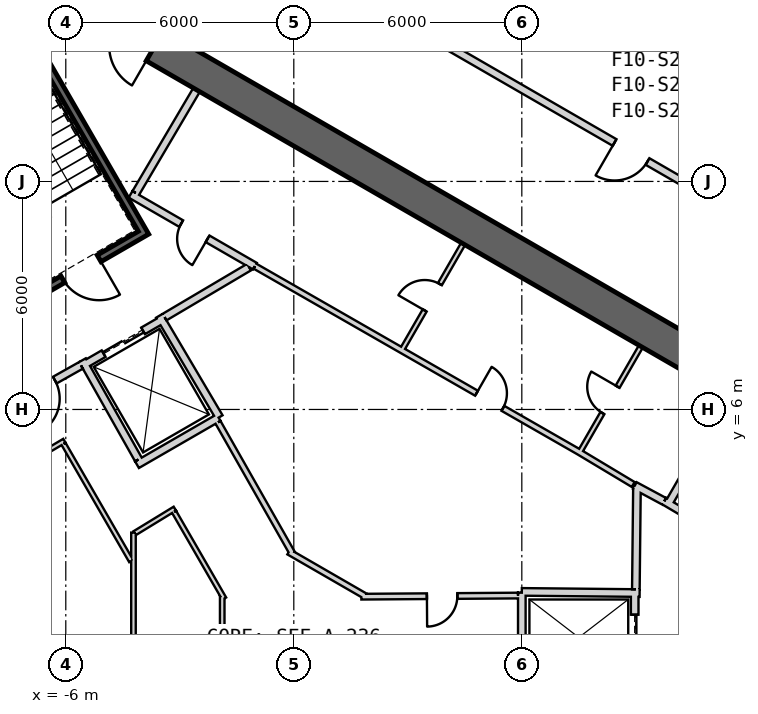
"""IFC4 building model, lengths in metres.
Left out: names, types, materials, properties, quantities, classifications, styles, units other than length and angle.
Written with IfcOpenShell. Run it as: python <this file> out.ifc"""

import sys

from ifc_helpers import new_model, si_unit, direction, frame, frame_2d, origin, place, context, subcontext, project, spatial, rectangle, extrude, element, fill, save


model = new_model("IFC4")
c1 = context("Model", 3, precision=1e-05, world=origin(), true_north=direction((0.0, 1.0)))
c2 = subcontext(c1, "Body", "Model", "MODEL_VIEW")
j1 = project(units=[si_unit("LENGTHUNIT", "METRE"), si_unit("PLANEANGLEUNIT", "RADIAN")], contexts=[c1])
p1 = place(None, origin())
s1 = spatial("IfcSite", under=j1, at=p1, CompositionType="ELEMENT")
p2 = place(p1, origin())
s2 = spatial("IfcBuilding", under=s1, at=p2, CompositionType="ELEMENT")
p3 = place(p2, frame((0.0, 0.0, 333.8)))
s3 = spatial("IfcBuildingStorey", under=s2, at=p3, CompositionType="ELEMENT", Elevation=333.8)
p4 = place(p3, frame((19.475, 2.208, 0.0), z_axis=(0.0, 0.0, 1.0), x_axis=(-0.866028369851, 0.499994862586, 0.0)))
e1 = element("IfcWall", 1, at=p4, inside=s3, PredefinedType="SHEAR", context=c2, shape_type="SweptSolid", body=[
    extrude(rectangle(XDim=31.523, YDim=0.9, at=frame_2d((15.762, 0.0))), origin(), (0.0, 0.0, 1.0), 3.9),
])
p5 = place(p4, frame((7.062, 0.0, 0.0)))
e2 = element("IfcOpeningElement", 2, at=p5, cuts=e1, PredefinedType="OPENING", context=c2, shape_type="SweptSolid", body=[
    extrude(rectangle(XDim=1.2, YDim=2.4, at=frame_2d((0.6, 1.2))), frame((0.0, 0.46, 0.0), z_axis=(0.0, -1.0, 0.0), x_axis=(1.0, 0.0, 0.0)), (0.0, 0.0, 1.0), 0.92),
])
p6 = place(p4, frame((3.612, 0.0, 0.0)))
e3 = element("IfcOpeningElement", 3, at=p6, cuts=e1, PredefinedType="OPENING", context=c2, shape_type="SweptSolid", body=[
    extrude(rectangle(XDim=1.2, YDim=2.4, at=frame_2d((0.6, 1.2))), frame((0.0, 0.46, 0.0), z_axis=(0.0, -1.0, 0.0), x_axis=(1.0, 0.0, 0.0)), (0.0, 0.0, 1.0), 0.92),
])
p7 = place(p4, frame((26.712, 0.0, 0.0)))
e4 = element("IfcOpeningElement", 4, at=p7, cuts=e1, PredefinedType="OPENING", context=c2, shape_type="SweptSolid", body=[
    extrude(rectangle(XDim=1.2, YDim=2.4, at=frame_2d((0.6, 1.2))), frame((0.0, 0.46, 0.0), z_axis=(0.0, -1.0, 0.0), x_axis=(1.0, 0.0, 0.0)), (0.0, 0.0, 1.0), 0.92),
])
p8 = place(p3, frame((9.847, 3.495, 0.0), z_axis=(0.0, 0.0, 1.0), x_axis=(0.499984717929, 0.866034226713, 0.0)))
e5 = element("IfcWall", 5, at=p8, inside=s3, PredefinedType="PLUMBINGWALL", context=c2, shape_type="SweptSolid", body=[
    extrude(rectangle(XDim=3.25, YDim=0.2, at=frame_2d((1.625, 0.0))), origin(), (0.0, 0.0, 1.0), 3.6),
])
p9 = place(p3, frame((12.073, 2.211, 0.0), z_axis=(0.0, 0.0, 1.0), x_axis=(-0.860414880418, 0.509594185166, 0.0)))
e6 = element("IfcWall", 6, at=p9, inside=s3, PredefinedType="PLUMBINGWALL", context=c2, shape_type="SweptSolid", body=[
    extrude(rectangle(XDim=2.7, YDim=0.2, at=frame_2d((1.35, 0.0))), origin(), (0.0, 0.0, 1.0), 3.6),
])
p10 = place(p3, frame((8.97, 1.2, 0.0), z_axis=(0.0, 0.0, 1.0), x_axis=(0.0, -1.0, 0.0)))
e7 = element("IfcWall", 7, at=p10, inside=s3, PredefinedType="PLUMBINGWALL", context=c2, shape_type="SweptSolid", body=[
    extrude(rectangle(XDim=2.4, YDim=0.2, at=frame_2d((1.2, 0.0))), origin(), (0.0, 0.0, 1.0), 3.6),
])
p11 = place(p10, frame((0.6, 0.0, 0.0)))
e8 = element("IfcOpeningElement", 8, at=p11, cuts=e7, PredefinedType="OPENING", context=c2, shape_type="SweptSolid", body=[
    extrude(rectangle(XDim=1.2, YDim=2.4, at=frame_2d((0.6, 1.2))), frame((0.0, 0.11, 0.0), z_axis=(0.0, -1.0, 0.0), x_axis=(1.0, 0.0, 0.0)), (0.0, 0.0, 1.0), 0.22),
])
p12 = place(p3, frame((6.0, 1.2, 0.0), z_axis=(0.0, 0.0, 1.0), x_axis=(0.999949988, -0.010001074852, 0.0)))
e9 = element("IfcWall", 9, at=p12, inside=s3, PredefinedType="PLUMBINGWALL", context=c2, shape_type="SweptSolid", body=[
    extrude(rectangle(XDim=3.1, YDim=0.2, at=frame_2d((1.55, 0.0))), origin(), (0.0, 0.0, 1.0), 3.6),
])
p13 = place(p3, frame((6.0, -1.1, 0.0), z_axis=(0.0, 0.0, 1.0), x_axis=(0.0, 1.0, 0.0)))
e10 = element("IfcWall", 10, at=p13, inside=s3, PredefinedType="PLUMBINGWALL", context=c2, shape_type="SweptSolid", body=[
    extrude(rectangle(XDim=2.28, YDim=0.2, at=frame_2d((1.14, 0.0))), origin(), (0.0, 0.0, 1.0), 3.6),
])
p14 = place(p3, frame((-7.854, 17.405, -0.3), z_axis=(0.0, 0.0, 1.0), x_axis=(0.499997992926, -0.866026562566, 0.0)))
e11 = element("IfcWall", 11, at=p14, inside=s3, PredefinedType="SHEAR", context=c2, shape_type="SweptSolid", body=[
    extrude(rectangle(XDim=7.9, YDim=0.2, at=frame_2d((3.95, 0.0))), origin(), (0.0, 0.0, 1.0), 3.9),
])
p15 = place(p3, frame((-7.159, 8.8, -0.3), z_axis=(0.0, 0.0, 1.0), x_axis=(0.866047807691, 0.499961193289, 0.0)))
e12 = element("IfcWall", 12, at=p15, inside=s3, PredefinedType="SHEAR", context=c2, shape_type="SweptSolid", body=[
    extrude(rectangle(XDim=3.6, YDim=0.2, at=frame_2d((1.8, 0.0))), origin(), (0.0, 0.0, 1.0), 3.9),
])
p16 = place(p15, frame((1.25, 0.0, 0.3)))
e13 = element("IfcOpeningElement", 13, at=p16, cuts=e12, PredefinedType="OPENING", context=c2, shape_type="SweptSolid", body=[
    extrude(rectangle(XDim=1.1, YDim=2.1, at=frame_2d((0.55, 1.05))), frame((0.0, 0.11, 0.0), z_axis=(0.0, -1.0, 0.0), x_axis=(1.0, 0.0, 0.0)), (0.0, 0.0, 1.0), 0.22),
])
p17 = place(p3, frame((-5.524, 7.168, 0.0), z_axis=(0.0, 0.0, 1.0), x_axis=(0.866024647952, 0.500001309137, 0.0)))
e14 = element("IfcWall", 14, at=p17, inside=s3, PredefinedType="PLUMBINGWALL", context=c2, shape_type="SweptSolid", body=[
    extrude(rectangle(XDim=2.4, YDim=0.2, at=frame_2d((1.2, 0.0))), origin(), (0.0, 0.0, 1.0), 3.6),
])
p18 = place(p17, frame((0.6, 0.0, 0.0)))
e15 = element("IfcOpeningElement", 15, at=p18, cuts=e14, PredefinedType="OPENING", context=c2, shape_type="SweptSolid", body=[
    extrude(rectangle(XDim=1.2, YDim=2.4, at=frame_2d((0.6, 1.2))), frame((0.0, 0.11, 0.0), z_axis=(0.0, -1.0, 0.0), x_axis=(1.0, 0.0, 0.0)), (0.0, 0.0, 1.0), 0.22),
])
p19 = place(p3, frame((-3.538, 8.465, 0.0), z_axis=(0.0, 0.0, 1.0), x_axis=(0.508647062354, -0.860975125052, 0.0)))
e16 = element("IfcWall", 16, at=p19, inside=s3, PredefinedType="PLUMBINGWALL", context=c2, shape_type="SweptSolid", body=[
    extrude(rectangle(XDim=3.1, YDim=0.2, at=frame_2d((1.55, 0.0))), origin(), (0.0, 0.0, 1.0), 3.6),
])
p20 = place(p3, frame((-1.979, 5.786, 0.0), z_axis=(0.0, 0.0, 1.0), x_axis=(-0.866016689309, -0.500015093611, 0.0)))
e17 = element("IfcWall", 17, at=p20, inside=s3, PredefinedType="PLUMBINGWALL", context=c2, shape_type="SweptSolid", body=[
    extrude(rectangle(XDim=2.479, YDim=0.2, at=frame_2d((1.24, 0.0))), origin(), (0.0, 0.0, 1.0), 3.6),
])
p21 = place(p3, frame((-5.562, 7.296, 0.0), z_axis=(0.0, 0.0, 1.0), x_axis=(0.49134651263, -0.870964180966, 0.0)))
e18 = element("IfcWall", 18, at=p21, inside=s3, PredefinedType="PLUMBINGWALL", context=c2, shape_type="SweptSolid", body=[
    extrude(rectangle(XDim=3.0, YDim=0.2, at=frame_2d((1.5, 0.0))), origin(), (0.0, 0.0, 1.0), 3.6),
])
p22 = place(p3, frame((7.508, 4.845, 0.0), z_axis=(0.0, 0.0, 1.0), x_axis=(0.500017246033, 0.866015446554, 0.0)))
e19 = element("IfcWall", 19, at=p22, inside=s3, PredefinedType="PARTITIONING", context=c2, shape_type="SweptSolid", body=[
    extrude(rectangle(XDim=3.25, YDim=0.12, at=frame_2d((1.625, 0.0))), origin(), (0.0, 0.0, 1.0), 3.6),
])
p23 = place(p22, frame((1.225, 0.0, 0.0)))
e20 = element("IfcOpeningElement", 20, at=p23, cuts=e19, PredefinedType="OPENING", context=c2, shape_type="SweptSolid", body=[
    extrude(rectangle(XDim=0.8, YDim=2.1, at=frame_2d((0.4, 1.05))), frame((0.0, 0.07, 0.0), z_axis=(0.0, -1.0, 0.0), x_axis=(1.0, 0.0, 0.0)), (0.0, 0.0, 1.0), 0.14),
])
p24 = place(p3, frame((8.974, 3.999, 0.0), z_axis=(0.0, 0.0, 1.0), x_axis=(0.880917147855, -0.473270513147, 0.0)))
e21 = element("IfcWall", 21, at=p24, inside=s3, PredefinedType="PARTITIONING", context=c2, shape_type="SweptSolid", body=[
    extrude(rectangle(XDim=0.878, YDim=0.2, at=frame_2d((0.439, 0.0))), origin(), (0.0, 0.0, 1.0), 3.6),
])
p25 = place(p3, frame((8.931, 4.026, 0.0), z_axis=(0.0, 0.0, 1.0), x_axis=(-0.857531586833, 0.514431314738, 0.0)))
e22 = element("IfcWall", 22, at=p25, inside=s3, PredefinedType="PLUMBINGWALL", context=c2, shape_type="SweptSolid", body=[
    extrude(rectangle(XDim=1.671, YDim=0.15, at=frame_2d((0.836, 0.0))), origin(), (0.0, 0.0, 1.0), 3.6),
])
p26 = place(p3, frame((2.832, 7.545, 0.0), z_axis=(0.0, 0.0, 1.0), x_axis=(0.500017246033, 0.866015446554, 0.0)))
e23 = element("IfcWall", 23, at=p26, inside=s3, PredefinedType="PARTITIONING", context=c2, shape_type="SweptSolid", body=[
    extrude(rectangle(XDim=3.25, YDim=0.12, at=frame_2d((1.625, 0.0))), origin(), (0.0, 0.0, 1.0), 3.6),
])
p27 = place(p26, frame((1.225, 0.0, 0.0)))
e24 = element("IfcOpeningElement", 24, at=p27, cuts=e23, PredefinedType="OPENING", context=c2, shape_type="SweptSolid", body=[
    extrude(rectangle(XDim=0.8, YDim=2.1, at=frame_2d((0.4, 1.05))), frame((0.0, 0.07, 0.0), z_axis=(0.0, -1.0, 0.0), x_axis=(1.0, 0.0, 0.0)), (0.0, 0.0, 1.0), 0.14),
])
p28 = place(p3, frame((7.497, 4.886, 0.0), z_axis=(0.0, 0.0, 1.0), x_axis=(-0.867541725638, 0.497364407931, 0.0)))
e25 = element("IfcWall", 25, at=p28, inside=s3, PredefinedType="PLUMBINGWALL", context=c2, shape_type="SweptSolid", body=[
    extrude(rectangle(XDim=9.822, YDim=0.15, at=frame_2d((4.911, 0.0))), origin(), (0.0, 0.0, 1.0), 3.6),
])
p29 = place(p28, frame((2.3, 0.0, 0.0)))
e26 = element("IfcOpeningElement", 26, at=p29, cuts=e25, PredefinedType="OPENING", context=c2, shape_type="SweptSolid", body=[
    extrude(rectangle(XDim=0.8, YDim=2.1, at=frame_2d((0.4, 1.05))), frame((0.0, 0.085, 0.0), z_axis=(0.0, -1.0, 0.0), x_axis=(1.0, 0.0, 0.0)), (0.0, 0.0, 1.0), 0.17),
])
p30 = place(p3, frame((-4.296, 11.66, 0.0), z_axis=(0.0, 0.0, 1.0), x_axis=(0.866027389382, -0.499996560828, 0.0)))
e27 = element("IfcWall", 27, at=p30, inside=s3, PredefinedType="PARTITIONING", context=c2, shape_type="SweptSolid", body=[
    extrude(rectangle(XDim=3.778, YDim=0.2, at=frame_2d((1.889, 0.0))), origin(), (0.0, 0.0, 1.0), 3.6),
])
p31 = place(p30, frame((1.539, 0.0, 0.0)))
e28 = element("IfcOpeningElement", 28, at=p31, cuts=e27, PredefinedType="OPENING", context=c2, shape_type="SweptSolid", body=[
    extrude(rectangle(XDim=0.8, YDim=2.1, at=frame_2d((0.4, 1.05))), frame((0.0, 0.11, 0.0), z_axis=(0.0, -1.0, 0.0), x_axis=(1.0, 0.0, 0.0)), (0.0, 0.0, 1.0), 0.22),
])
p32 = place(p3, frame((-2.558, 14.409, 0.0), z_axis=(0.0, 0.0, 1.0), x_axis=(-0.508018930956, -0.861345903683, 0.0)))
e29 = element("IfcWall", 29, at=p32, inside=s3, PredefinedType="PARTITIONING", context=c2, shape_type="SweptSolid", body=[
    extrude(rectangle(XDim=3.15, YDim=0.2, at=frame_2d((1.575, 0.0))), origin(), (0.0, 0.0, 1.0), 3.6),
])
p33 = place(p3, frame((9.001, 1.27, 0.0), z_axis=(0.0, 0.0, 1.0), x_axis=(0.010751103362, 0.999942205218, 0.0)))
e30 = element("IfcWall", 30, at=p33, inside=s3, PredefinedType="PARTITIONING", context=c2, shape_type="SweptSolid", body=[
    extrude(rectangle(XDim=2.725, YDim=0.2, at=frame_2d((1.363, 0.0))), origin(), (0.0, 0.0, 1.0), 3.6),
])
p34 = place(p3, frame((-1.179, 9.745, 0.0), z_axis=(0.0, 0.0, 1.0), x_axis=(-0.860630814782, -0.509229418482, 0.0)))
e31 = element("IfcWall", 31, at=p34, inside=s3, PredefinedType="PARTITIONING", context=c2, shape_type="SweptSolid", body=[
    extrude(rectangle(XDim=2.582, YDim=0.2, at=frame_2d((1.291, 0.0))), origin(), (0.0, 0.0, 1.0), 3.6),
])
p35 = place(p3, frame((-5.6, 7.16, 0.0), z_axis=(0.0, 0.0, 1.0), x_axis=(-0.871363259478, -0.490638431059, 0.0)))
e32 = element("IfcWall", 32, at=p35, inside=s3, PredefinedType="PARTITIONING", context=c2, shape_type="SweptSolid", body=[
    extrude(rectangle(XDim=2.581, YDim=0.2, at=frame_2d((1.291, 0.0))), origin(), (0.0, 0.0, 1.0), 3.6),
])
p36 = place(p35, frame((0.791, 0.0, 0.0)))
e33 = element("IfcOpeningElement", 33, at=p36, cuts=e32, PredefinedType="OPENING", context=c2, shape_type="SweptSolid", body=[
    extrude(rectangle(XDim=1.0, YDim=2.1, at=frame_2d((0.5, 1.05))), frame((0.0, 0.11, 0.0), z_axis=(0.0, -1.0, 0.0), x_axis=(1.0, 0.0, 0.0)), (0.0, 0.0, 1.0), 0.22),
])
p37 = place(p3, frame((1.778, 1.074, 0.0), z_axis=(0.0, 0.0, 1.0), x_axis=(0.999973898196, 0.007225159347, 0.0)))
e34 = element("IfcWall", 34, at=p37, inside=s3, PredefinedType="PLUMBINGWALL", context=c2, shape_type="SweptSolid", body=[
    extrude(rectangle(XDim=4.122, YDim=0.15, at=frame_2d((2.061, 0.0))), origin(), (0.0, 0.0, 1.0), 3.6),
])
p38 = place(p37, frame((1.725, 0.0, 0.0)))
e35 = element("IfcOpeningElement", 35, at=p38, cuts=e34, PredefinedType="OPENING", context=c2, shape_type="SweptSolid", body=[
    extrude(rectangle(XDim=0.8, YDim=2.1, at=frame_2d((0.4, 1.05))), frame((0.0, 0.085, 0.0), z_axis=(0.0, -1.0, 0.0), x_axis=(1.0, 0.0, 0.0)), (0.0, 0.0, 1.0), 0.17),
])
p39 = place(p3, frame((-0.132, 2.251, 0.0), z_axis=(0.0, 0.0, 1.0), x_axis=(0.866028486751, -0.499994660107, 0.0)))
e36 = element("IfcWall", 36, at=p39, inside=s3, PredefinedType="PLUMBINGWALL", context=c2, shape_type="SweptSolid", body=[
    extrude(rectangle(XDim=2.329, YDim=0.15, at=frame_2d((1.165, 0.0))), origin(), (0.0, 0.0, 1.0), 3.6),
])
p40 = place(p3, frame((-1.994, 5.661, 0.0), z_axis=(0.0, 0.0, 1.0), x_axis=(0.493780191404, -0.869586753911, 0.0)))
e37 = element("IfcWall", 37, at=p40, inside=s3, PredefinedType="PLUMBINGWALL", context=c2, shape_type="SweptSolid", body=[
    extrude(rectangle(XDim=3.971, YDim=0.15, at=frame_2d((1.986, 0.0))), origin(), (0.0, 0.0, 1.0), 3.6),
])
p41 = place(p3, frame((-4.219, -2.76, 0.0), z_axis=(0.0, 0.0, 1.0), x_axis=(0.0, 1.0, 0.0)))
e38 = element("IfcWall", 38, at=p41, inside=s3, PredefinedType="PARTITIONING", context=c2, shape_type="SweptSolid", body=[
    extrude(rectangle(XDim=5.521, YDim=0.12, at=frame_2d((2.76, 0.0))), origin(), (0.0, 0.0, 1.0), 3.6),
])
p42 = place(p3, frame((-6.037, 5.176, 0.0), z_axis=(0.0, 0.0, 1.0), x_axis=(-0.860106072674, -0.510115225953, 0.0)))
e39 = element("IfcWall", 39, at=p42, inside=s3, PredefinedType="PARTITIONING", context=c2, shape_type="SweptSolid", body=[
    extrude(rectangle(XDim=2.225, YDim=0.12, at=frame_2d((1.112, 0.0))), origin(), (0.0, 0.0, 1.0), 3.6),
])
p43 = place(p3, frame((-4.279, 2.011, 0.0), z_axis=(0.0, 0.0, 1.0), x_axis=(-0.500027278734, 0.866009653827, 0.0)))
e40 = element("IfcWall", 40, at=p43, inside=s3, PredefinedType="PARTITIONING", context=c2, shape_type="SweptSolid", body=[
    extrude(rectangle(XDim=3.559, YDim=0.12, at=frame_2d((1.779, 0.0))), origin(), (0.0, 0.0, 1.0), 3.6),
])
p44 = place(p3, frame((-3.13, 3.391, 0.0), z_axis=(0.0, 0.0, 1.0), x_axis=(-0.853228335638, -0.521537541567, 0.0)))
e41 = element("IfcWall", 41, at=p44, inside=s3, PredefinedType="PARTITIONING", context=c2, shape_type="SweptSolid", body=[
    extrude(rectangle(XDim=1.241, YDim=0.12, at=frame_2d((0.621, 0.0))), origin(), (0.0, 0.0, 1.0), 3.6),
])
p45 = place(p3, frame((-1.832, 1.022, 0.0), z_axis=(0.0, 0.0, 1.0), x_axis=(-0.500000102728, 0.866025344474, 0.0)))
e42 = element("IfcWall", 42, at=p45, inside=s3, PredefinedType="PARTITIONING", context=c2, shape_type="SweptSolid", body=[
    extrude(rectangle(XDim=2.639, YDim=0.12, at=frame_2d((1.319, 0.0))), origin(), (0.0, 0.0, 1.0), 3.6),
])
p46 = place(p3, frame((-1.884, -1.216, 0.0), z_axis=(0.0, 0.0, 1.0), x_axis=(0.0, 1.0, 0.0)))
e43 = element("IfcWall", 43, at=p46, inside=s3, PredefinedType="PARTITIONING", context=c2, shape_type="SweptSolid", body=[
    extrude(rectangle(XDim=2.31, YDim=0.12, at=frame_2d((1.155, 0.0))), origin(), (0.0, 0.0, 1.0), 3.6),
])
p47 = place(p3, frame((16.523, 8.358, 0.0), z_axis=(0.0, 0.0, 1.0), x_axis=(-0.866025545866, 0.499999753908, 0.0)))
e44 = element("IfcWall", 44, at=p47, inside=s3, PredefinedType="PARTITIONING", context=c2, shape_type="SweptSolid", body=[
    extrude(rectangle(XDim=26.471, YDim=0.2, at=frame_2d((13.235, 0.0))), origin(), (0.0, 0.0, 1.0), 2.97),
])
p48 = place(p47, frame((21.568, 0.0, 0.0)))
e45 = element("IfcOpeningElement", 45, at=p48, cuts=e44, PredefinedType="OPENING", context=c2, shape_type="SweptSolid", body=[
    extrude(rectangle(XDim=1.0, YDim=2.1, at=frame_2d((0.5, 1.05))), frame((0.0, 0.11, 0.0), z_axis=(0.0, -1.0, 0.0), x_axis=(1.0, 0.0, 0.0)), (0.0, 0.0, 1.0), 0.22),
])
p49 = place(p47, frame((8.333, 0.0, 0.0)))
e46 = element("IfcOpeningElement", 46, at=p49, cuts=e44, PredefinedType="OPENING", context=c2, shape_type="SweptSolid", body=[
    extrude(rectangle(XDim=1.0, YDim=2.1, at=frame_2d((0.5, 1.05))), frame((0.0, 0.11, 0.0), z_axis=(0.0, -1.0, 0.0), x_axis=(1.0, 0.0, 0.0)), (0.0, 0.0, 1.0), 0.22),
])
p50 = place(p11, origin())
e47 = element("IfcDoor", 47, at=p50, inside=s3, OperationType="SLIDING_TO_LEFT", PredefinedType="USERDEFINED", context=c2, shape_type="SweptSolid", body=[
    extrude(rectangle(XDim=1.2, YDim=2.4, at=frame_2d((0.6, 1.2))), frame((0.0, 0.025, 0.0), z_axis=(0.0, -1.0, 0.0), x_axis=(1.0, 0.0, 0.0)), (0.0, 0.0, 1.0), 0.05),
])
fill(e8, e47)
p51 = place(p16, origin())
e48 = element("IfcDoor", 48, at=p51, inside=s3, OperationType="SINGLE_SWING_LEFT", PredefinedType="USERDEFINED", context=c2, shape_type="SweptSolid", body=[
    extrude(rectangle(XDim=1.1, YDim=2.1, at=frame_2d((0.55, 1.05))), frame((0.0, 0.025, 0.0), z_axis=(0.0, -1.0, 0.0), x_axis=(1.0, 0.0, 0.0)), (0.0, 0.0, 1.0), 0.05),
])
fill(e13, e48)
p52 = place(p36, origin())
e49 = element("IfcDoor", 49, at=p52, inside=s3, OperationType="SINGLE_SWING_RIGHT", PredefinedType="USERDEFINED", context=c2, shape_type="SweptSolid", body=[
    extrude(rectangle(XDim=1.0, YDim=2.1, at=frame_2d((0.5, 1.05))), frame((0.0, 0.025, 0.0), z_axis=(0.0, -1.0, 0.0), x_axis=(1.0, 0.0, 0.0)), (0.0, 0.0, 1.0), 0.05),
])
fill(e33, e49)
p53 = place(p18, origin())
e50 = element("IfcDoor", 50, at=p53, inside=s3, OperationType="SLIDING_TO_LEFT", PredefinedType="USERDEFINED", context=c2, shape_type="SweptSolid", body=[
    extrude(rectangle(XDim=1.2, YDim=2.4, at=frame_2d((0.6, 1.2))), frame((0.0, 0.025, 0.0), z_axis=(0.0, -1.0, 0.0), x_axis=(1.0, 0.0, 0.0)), (0.0, 0.0, 1.0), 0.05),
])
fill(e15, e50)
p54 = place(p38, origin())
e51 = element("IfcDoor", 51, at=p54, inside=s3, OperationType="SINGLE_SWING_LEFT", PredefinedType="USERDEFINED", context=c2, shape_type="SweptSolid", body=[
    extrude(rectangle(XDim=0.8, YDim=2.1, at=frame_2d((0.4, 1.05))), frame((0.0, 0.025, 0.0), z_axis=(0.0, -1.0, 0.0), x_axis=(1.0, 0.0, 0.0)), (0.0, 0.0, 1.0), 0.05),
])
fill(e35, e51)
p55 = place(p23, origin())
e52 = element("IfcDoor", 52, at=p55, inside=s3, OperationType="SINGLE_SWING_LEFT", PredefinedType="USERDEFINED", context=c2, shape_type="SweptSolid", body=[
    extrude(rectangle(XDim=0.8, YDim=2.1, at=frame_2d((0.4, 1.05))), frame((0.0, 0.025, 0.0), z_axis=(0.0, -1.0, 0.0), x_axis=(1.0, 0.0, 0.0)), (0.0, 0.0, 1.0), 0.05),
])
fill(e20, e52)
p56 = place(p27, origin())
e53 = element("IfcDoor", 53, at=p56, inside=s3, OperationType="SINGLE_SWING_LEFT", PredefinedType="USERDEFINED", context=c2, shape_type="SweptSolid", body=[
    extrude(rectangle(XDim=0.8, YDim=2.1, at=frame_2d((0.4, 1.05))), frame((0.0, 0.025, 0.0), z_axis=(0.0, -1.0, 0.0), x_axis=(1.0, 0.0, 0.0)), (0.0, 0.0, 1.0), 0.05),
])
fill(e24, e53)
p57 = place(p31, origin())
e54 = element("IfcDoor", 54, at=p57, inside=s3, OperationType="SINGLE_SWING_LEFT", PredefinedType="USERDEFINED", context=c2, shape_type="SweptSolid", body=[
    extrude(rectangle(XDim=0.8, YDim=2.1, at=frame_2d((0.4, 1.05))), frame((0.0, 0.025, 0.0), z_axis=(0.0, -1.0, 0.0), x_axis=(1.0, 0.0, 0.0)), (0.0, 0.0, 1.0), 0.05),
])
fill(e28, e54)
p58 = place(p29, origin())
e55 = element("IfcDoor", 55, at=p58, inside=s3, OperationType="SINGLE_SWING_LEFT", PredefinedType="USERDEFINED", context=c2, shape_type="SweptSolid", body=[
    extrude(rectangle(XDim=0.8, YDim=2.1, at=frame_2d((0.4, 1.05))), frame((0.0, 0.025, 0.0), z_axis=(0.0, -1.0, 0.0), x_axis=(1.0, 0.0, 0.0)), (0.0, 0.0, 1.0), 0.05),
])
fill(e26, e55)
p59 = place(p49, origin())
e56 = element("IfcDoor", 56, at=p59, inside=s3, OperationType="SINGLE_SWING_LEFT", PredefinedType="USERDEFINED", context=c2, shape_type="SweptSolid", body=[
    extrude(rectangle(XDim=1.0, YDim=2.1, at=frame_2d((0.5, 1.05))), frame((0.0, 0.025, 0.0), z_axis=(0.0, -1.0, 0.0), x_axis=(1.0, 0.0, 0.0)), (0.0, 0.0, 1.0), 0.05),
])
fill(e46, e56)
save(model, sys.argv[1])
